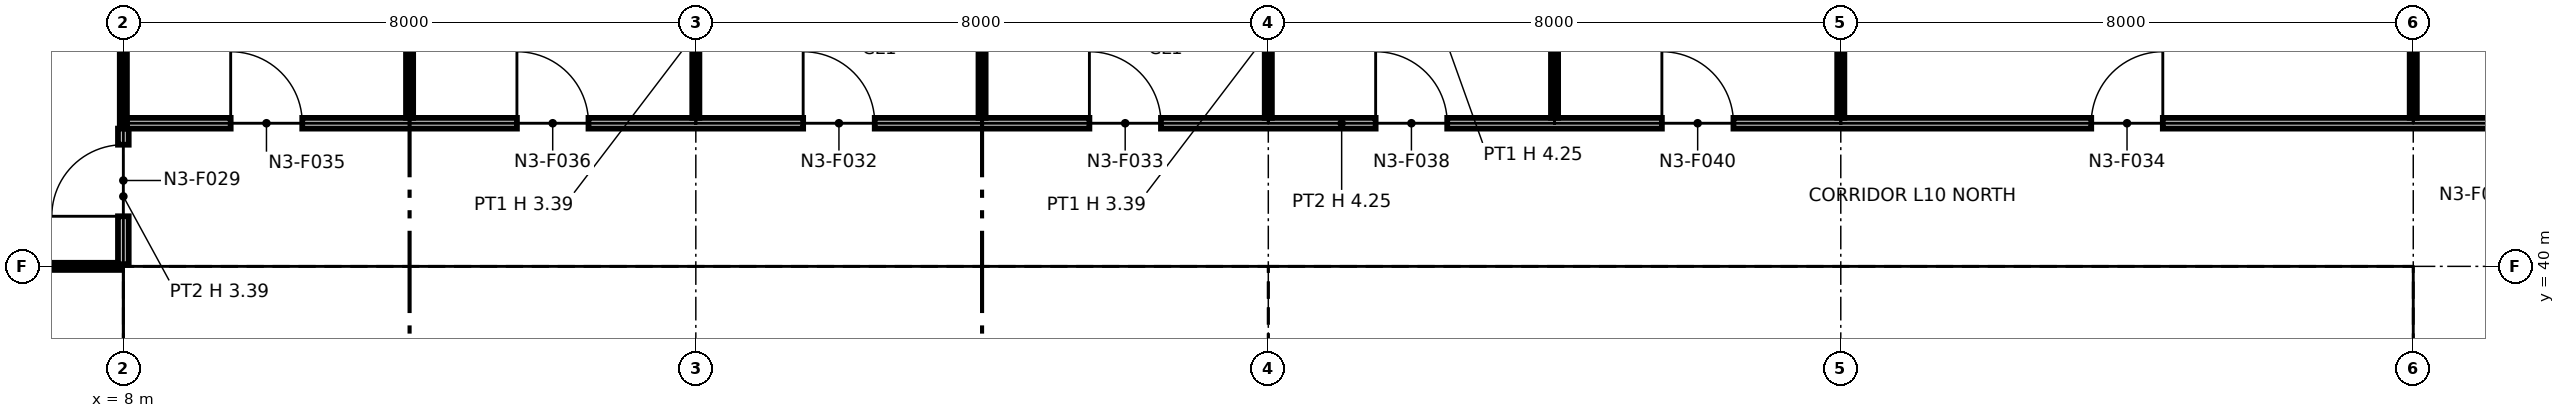
"""IFC4 building model, lengths in metres.
Left out: names, types, materials, properties, quantities, classifications, styles, units other than length and angle.
Written with IfcOpenShell. Run it as: python <this file> out.ifc"""

import sys

from ifc_helpers import new_model, si_unit, direction, frame, frame_2d, origin, origin_2d, place, context, subcontext, project, spatial, polyline, rectangle, i_section, outline, extrude, element, fill, save


model = new_model("IFC4")
c1 = context("Model", 3, precision=1e-05, world=origin(), true_north=direction((0.0, 1.0)))
c2 = subcontext(c1, "Body", "Model", "MODEL_VIEW")
j1 = project(units=[si_unit("LENGTHUNIT", "METRE"), si_unit("PLANEANGLEUNIT", "RADIAN")], contexts=[c1])
p1 = place(None, origin())
s1 = spatial("IfcSite", under=j1, at=p1, CompositionType="ELEMENT")
p2 = place(p1, origin())
s2 = spatial("IfcBuilding", under=s1, at=p2, CompositionType="ELEMENT")
p3 = place(p2, frame((0.0, 0.0, 61.2)))
s3 = spatial("IfcBuildingStorey", under=s2, at=p3, CompositionType="ELEMENT", Elevation=61.2)
for number, where, z_axis, x_axis in (
    (1, (8.0, 40.0, 0.0), (0.0, 0.0, 1.0), (1.0, 0.0, 0.0)),
    (2, (16.0, 40.0, 0.0), (0.0, 0.0, 1.0), (1.0, 0.0, 0.0)),
):
    element("IfcColumn", number, at=place(p3, frame(where, z_axis=z_axis, x_axis=x_axis)), inside=s3, PredefinedType="COLUMN", context=c2, shape_type="SweptSolid", body=[
        extrude(i_section(OverallWidth=0.399, OverallDepth=0.386, WebThickness=0.021, FlangeThickness=0.033, at=origin_2d()), origin(), (0.0, 0.0, 1.0), 4.25),
    ])
p4 = place(p3, frame((24.0, 40.0, 0.0), z_axis=(0.0, 0.0, 1.0), x_axis=(1.0, 0.0, 0.0)))
e3 = element("IfcColumn", 3, at=p4, inside=s3, PredefinedType="COLUMN", context=c2, shape_type="SweptSolid", body=[
    extrude(i_section(OverallWidth=0.401, OverallDepth=0.399, WebThickness=0.025, FlangeThickness=0.04, at=origin_2d()), origin(), (0.0, 0.0, 1.0), 4.25),
])
for number, where, z_axis, x_axis in (
    (4, (32.0, 40.0, 0.0), (0.0, 0.0, 1.0), (1.0, 0.0, 0.0)),
    (5, (40.0, 40.0, 0.0), (0.0, 0.0, 1.0), (1.0, 0.0, 0.0)),
):
    element("IfcColumn", number, at=place(p3, frame(where, z_axis=z_axis, x_axis=x_axis)), inside=s3, PredefinedType="COLUMN", context=c2, shape_type="SweptSolid", body=[
        extrude(i_section(OverallWidth=0.371, OverallDepth=0.361, WebThickness=0.012, FlangeThickness=0.02, at=origin_2d()), origin(), (0.0, 0.0, 1.0), 4.25),
    ])
p5 = place(p3, frame((8.75, 32.85, 0.0), z_axis=(0.0, 0.0, 1.0), x_axis=(0.0, 1.0, 0.0)))
e6 = element("IfcWall", 6, at=p5, inside=s3, PredefinedType="PARTITIONING", context=c2, shape_type="SweptSolid", body=[
    extrude(outline(polyline([(0.0, 0.0), (6.3, 0.0), (6.3, 4.25), (3.231, 4.25), (3.23, 3.789), (3.07, 3.789), (3.069, 4.25), (0.0, 4.25), (0.0, 0.0)])), frame((0.0, 0.1, 0.0), z_axis=(0.0, -1.0, 0.0), x_axis=(1.0, 0.0, 0.0)), (0.0, 0.0, 1.0), 0.2),
])
p6 = place(p3, frame((8.65, 39.25, 0.0), z_axis=(0.0, 0.0, 1.0), x_axis=(1.0, 0.0, 0.0)))
e7 = element("IfcWall", 7, at=p6, inside=s3, PredefinedType="PARTITIONING", context=c2, shape_type="SweptSolid", body=[
    extrude(outline(polyline([(0.0, 0.0), (14.7, 0.0), (14.7, 4.25), (7.469, 4.25), (7.469, 3.632), (7.231, 3.632), (7.23, 4.25), (0.0, 4.25), (0.0, 0.0)])), frame((0.0, 0.1, 0.0), z_axis=(0.0, -1.0, 0.0), x_axis=(1.0, 0.0, 0.0)), (0.0, 0.0, 1.0), 0.2),
])
for number, where, z_axis, x_axis in (
    (8, (10.675, 34.95, 0.0), (0.0, 0.0, 1.0), (0.0, 1.0, 0.0)),
    (9, (12.425, 34.95, 0.0), (0.0, 0.0, 1.0), (0.0, 1.0, 0.0)),
    (10, (14.275, 34.95, 0.0), (0.0, 0.0, 1.0), (0.0, 1.0, 0.0)),
):
    element("IfcWall", number, at=place(p3, frame(where, z_axis=z_axis, x_axis=x_axis)), inside=s3, PredefinedType="PARTITIONING", context=c2, shape_type="SweptSolid", body=[
        extrude(outline(polyline([(0.0, 0.0), (4.2, 0.0), (4.2, 4.25), (1.132, 4.25), (1.131, 3.789), (0.969, 3.789), (0.969, 4.25), (0.0, 4.25), (0.0, 0.0)])), frame((0.0, 0.075, 0.0), z_axis=(0.0, -1.0, 0.0), x_axis=(1.0, 0.0, 0.0)), (0.0, 0.0, 1.0), 0.15),
    ])
p7 = place(p3, frame((16.0, 34.95, 0.0), z_axis=(0.0, 0.0, 1.0), x_axis=(0.0, 1.0, 0.0)))
e11 = element("IfcWall", 11, at=p7, inside=s3, PredefinedType="PARTITIONING", context=c2, shape_type="SweptSolid", body=[
    extrude(rectangle(XDim=4.2, YDim=0.6, at=frame_2d((2.1, 0.0))), origin(), (0.0, 0.0, 1.0), 3.632),
])
for number, where, z_axis, x_axis in (
    (12, (19.2, 32.85, 0.0), (0.0, 0.0, 1.0), (0.0, 1.0, 0.0)),
    (13, (23.25, 32.85, 0.0), (0.0, 0.0, 1.0), (0.0, 1.0, 0.0)),
):
    element("IfcWall", number, at=place(p3, frame(where, z_axis=z_axis, x_axis=x_axis)), inside=s3, PredefinedType="PARTITIONING", context=c2, shape_type="SweptSolid", body=[
        extrude(rectangle(XDim=6.3, YDim=0.2, at=frame_2d((3.15, 0.0))), origin(), (0.0, 0.0, 1.0), 4.25),
    ])
p8 = place(p3, frame((24.75, 32.85, 0.0), z_axis=(0.0, 0.0, 1.0), x_axis=(0.0, 1.0, 0.0)))
e14 = element("IfcWall", 14, at=p8, inside=s3, PredefinedType="PARTITIONING", context=c2, shape_type="SweptSolid", body=[
    extrude(outline(polyline([(0.0, 0.0), (6.3, 0.0), (6.3, 4.25), (3.231, 4.25), (3.23, 3.789), (3.07, 3.789), (3.069, 4.25), (0.0, 4.25), (0.0, 0.0)])), frame((0.0, 0.1, 0.0), z_axis=(0.0, -1.0, 0.0), x_axis=(1.0, 0.0, 0.0)), (0.0, 0.0, 1.0), 0.2),
])
p9 = place(p3, frame((24.65, 39.25, 0.0), z_axis=(0.0, 0.0, 1.0), x_axis=(1.0, 0.0, 0.0)))
e15 = element("IfcWall", 15, at=p9, inside=s3, PredefinedType="PARTITIONING", context=c2, shape_type="SweptSolid", body=[
    extrude(outline(polyline([(0.0, 0.0), (14.7, 0.0), (14.7, 4.25), (7.469, 4.25), (7.469, 3.632), (7.231, 3.632), (7.23, 4.25), (0.0, 4.25), (0.0, 0.0)])), frame((0.0, 0.1, 0.0), z_axis=(0.0, -1.0, 0.0), x_axis=(1.0, 0.0, 0.0)), (0.0, 0.0, 1.0), 0.2),
])
for number, where, z_axis, x_axis in (
    (16, (27.2, 36.4, 0.0), (0.0, 0.0, 1.0), (0.0, 1.0, 0.0)),
    (17, (29.5, 36.4, 0.0), (0.0, 0.0, 1.0), (0.0, 1.0, 0.0)),
):
    element("IfcWall", number, at=place(p3, frame(where, z_axis=z_axis, x_axis=x_axis)), inside=s3, PredefinedType="PARTITIONING", context=c2, shape_type="SweptSolid", body=[
        extrude(rectangle(XDim=2.75, YDim=0.2, at=frame_2d((1.375, 0.0))), origin(), (0.0, 0.0, 1.0), 4.25),
    ])
p10 = place(p3, frame((32.0, 32.85, 0.0), z_axis=(0.0, 0.0, 1.0), x_axis=(0.0, 1.0, 0.0)))
e18 = element("IfcWall", 18, at=p10, inside=s3, PredefinedType="PARTITIONING", context=c2, shape_type="SweptSolid", body=[
    extrude(rectangle(XDim=6.3, YDim=0.6, at=frame_2d((3.15, 0.0))), origin(), (0.0, 0.0, 1.0), 3.632),
])
for number, where, z_axis, x_axis in (
    (19, (35.6, 32.85, 0.0), (0.0, 0.0, 1.0), (0.0, 1.0, 0.0)),
    (20, (39.25, 32.85, 0.0), (0.0, 0.0, 1.0), (0.0, 1.0, 0.0)),
):
    element("IfcWall", number, at=place(p3, frame(where, z_axis=z_axis, x_axis=x_axis)), inside=s3, PredefinedType="PARTITIONING", context=c2, shape_type="SweptSolid", body=[
        extrude(rectangle(XDim=6.3, YDim=0.2, at=frame_2d((3.15, 0.0))), origin(), (0.0, 0.0, 1.0), 4.25),
    ])
p11 = place(p3, frame((4.05, 40.0, 0.0), z_axis=(0.0, 0.0, 1.0), x_axis=(1.0, 0.0, 0.0)))
e21 = element("IfcWall", 21, at=p11, inside=s3, PredefinedType="PARTITIONING", context=c2, shape_type="SweptSolid", body=[
    extrude(rectangle(XDim=3.92, YDim=0.1, at=frame_2d((1.96, 0.0))), origin(), (0.0, 0.0, 1.0), 3.391),
])
p12 = place(p3, frame((8.0, 40.03, 0.0), z_axis=(0.0, 0.0, 1.0), x_axis=(0.0, 1.0, 0.0)))
e22 = element("IfcWall", 22, at=p12, inside=s3, PredefinedType="PARTITIONING", context=c2, shape_type="SweptSolid", body=[
    extrude(rectangle(XDim=1.895, YDim=0.15, at=frame_2d((0.948, 0.0))), origin(), (0.0, 0.0, 1.0), 3.391),
])
p13 = place(p12, frame((0.67, 0.0, 0.0)))
e23 = element("IfcOpeningElement", 23, at=p13, cuts=e22, PredefinedType="OPENING", context=c2, shape_type="SweptSolid", body=[
    extrude(rectangle(XDim=1.0, YDim=2.1, at=frame_2d((0.5, 1.05))), frame((0.0, 0.085, 0.0), z_axis=(0.0, -1.0, 0.0), x_axis=(1.0, 0.0, 0.0)), (0.0, 0.0, 1.0), 0.17),
])
p14 = place(p3, frame((8.05, 42.0, 0.0), z_axis=(0.0, 0.0, 1.0), x_axis=(1.0, 0.0, 0.0)))
e24 = element("IfcWall", 24, at=p14, inside=s3, PredefinedType="PARTITIONING", context=c2, shape_type="SweptSolid", body=[
    extrude(rectangle(XDim=33.95, YDim=0.15, at=frame_2d((16.975, 0.0))), origin(), (0.0, 0.0, 1.0), 4.25),
])
p15 = place(p14, frame((9.45, 0.0, 0.0)))
e25 = element("IfcOpeningElement", 25, at=p15, cuts=e24, PredefinedType="OPENING", context=c2, shape_type="SweptSolid", body=[
    extrude(rectangle(XDim=1.0, YDim=2.1, at=frame_2d((0.5, 1.05))), frame((0.0, 0.085, 0.0), z_axis=(0.0, -1.0, 0.0), x_axis=(1.0, 0.0, 0.0)), (0.0, 0.0, 1.0), 0.17),
])
p16 = place(p14, frame((13.45, 0.0, 0.0)))
e26 = element("IfcOpeningElement", 26, at=p16, cuts=e24, PredefinedType="OPENING", context=c2, shape_type="SweptSolid", body=[
    extrude(rectangle(XDim=1.0, YDim=2.1, at=frame_2d((0.5, 1.05))), frame((0.0, 0.085, 0.0), z_axis=(0.0, -1.0, 0.0), x_axis=(1.0, 0.0, 0.0)), (0.0, 0.0, 1.0), 0.17),
])
p17 = place(p14, frame((27.45, 0.0, 0.0)))
e27 = element("IfcOpeningElement", 27, at=p17, cuts=e24, PredefinedType="OPENING", context=c2, shape_type="SweptSolid", body=[
    extrude(rectangle(XDim=1.0, YDim=2.1, at=frame_2d((0.5, 1.05))), frame((0.0, 0.085, 0.0), z_axis=(0.0, -1.0, 0.0), x_axis=(1.0, 0.0, 0.0)), (0.0, 0.0, 1.0), 0.17),
])
p18 = place(p14, frame((1.45, 0.0, 0.0)))
e28 = element("IfcOpeningElement", 28, at=p18, cuts=e24, PredefinedType="OPENING", context=c2, shape_type="SweptSolid", body=[
    extrude(rectangle(XDim=1.0, YDim=2.1, at=frame_2d((0.5, 1.05))), frame((0.0, 0.085, 0.0), z_axis=(0.0, -1.0, 0.0), x_axis=(1.0, 0.0, 0.0)), (0.0, 0.0, 1.0), 0.17),
])
p19 = place(p14, frame((5.45, 0.0, 0.0)))
e29 = element("IfcOpeningElement", 29, at=p19, cuts=e24, PredefinedType="OPENING", context=c2, shape_type="SweptSolid", body=[
    extrude(rectangle(XDim=1.0, YDim=2.1, at=frame_2d((0.5, 1.05))), frame((0.0, 0.085, 0.0), z_axis=(0.0, -1.0, 0.0), x_axis=(1.0, 0.0, 0.0)), (0.0, 0.0, 1.0), 0.17),
])
p20 = place(p14, frame((17.45, 0.0, 0.0)))
e30 = element("IfcOpeningElement", 30, at=p20, cuts=e24, PredefinedType="OPENING", context=c2, shape_type="SweptSolid", body=[
    extrude(rectangle(XDim=1.0, YDim=2.1, at=frame_2d((0.5, 1.05))), frame((0.0, 0.085, 0.0), z_axis=(0.0, -1.0, 0.0), x_axis=(1.0, 0.0, 0.0)), (0.0, 0.0, 1.0), 0.17),
])
p21 = place(p14, frame((21.45, 0.0, 0.0)))
e31 = element("IfcOpeningElement", 31, at=p21, cuts=e24, PredefinedType="OPENING", context=c2, shape_type="SweptSolid", body=[
    extrude(rectangle(XDim=1.0, YDim=2.1, at=frame_2d((0.5, 1.05))), frame((0.0, 0.085, 0.0), z_axis=(0.0, -1.0, 0.0), x_axis=(1.0, 0.0, 0.0)), (0.0, 0.0, 1.0), 0.17),
])
p22 = place(p3, frame((8.0, 42.0, 0.0), z_axis=(0.0, 0.0, 1.0), x_axis=(0.0, 1.0, 0.0)))
e32 = element("IfcWall", 32, at=p22, inside=s3, PredefinedType="PARTITIONING", context=c2, shape_type="SweptSolid", body=[
    extrude(rectangle(XDim=5.87, YDim=0.1, at=frame_2d((2.935, 0.0))), origin(), (0.0, 0.0, 1.0), 3.391),
])
for number, where, z_axis, x_axis in (
    (33, (12.0, 42.075, 0.0), (0.0, 0.0, 1.0), (0.0, 1.0, 0.0)),
    (34, (16.0, 42.075, 0.0), (0.0, 0.0, 1.0), (0.0, 1.0, 0.0)),
):
    element("IfcWall", number, at=place(p3, frame(where, z_axis=z_axis, x_axis=x_axis)), inside=s3, PredefinedType="PARTITIONING", context=c2, shape_type="SweptSolid", body=[
        extrude(rectangle(XDim=2.375, YDim=0.1, at=frame_2d((1.188, 0.0))), origin(), (0.0, 0.0, 1.0), 3.391),
    ])
p23 = place(p3, frame((20.0, 42.075, 0.0), z_axis=(0.0, 0.0, 1.0), x_axis=(0.0, 1.0, 0.0)))
e35 = element("IfcWall", 35, at=p23, inside=s3, PredefinedType="PARTITIONING", context=c2, shape_type="SweptSolid", body=[
    extrude(rectangle(XDim=3.095, YDim=0.1, at=frame_2d((1.547, 0.0))), origin(), (0.0, 0.0, 1.0), 3.391),
])
for number, where, z_axis, x_axis in (
    (36, (24.0, 42.075, 0.0), (0.0, 0.0, 1.0), (0.0, 1.0, 0.0)),
    (37, (28.0, 42.075, 0.0), (0.0, 0.0, 1.0), (0.0, 1.0, 0.0)),
):
    element("IfcWall", number, at=place(p3, frame(where, z_axis=z_axis, x_axis=x_axis)), inside=s3, PredefinedType="PARTITIONING", context=c2, shape_type="SweptSolid", body=[
        extrude(rectangle(XDim=2.375, YDim=0.1, at=frame_2d((1.188, 0.0))), origin(), (0.0, 0.0, 1.0), 3.391),
    ])
for number, where, z_axis, x_axis in (
    (38, (32.0, 42.075, 0.0), (0.0, 0.0, 1.0), (0.0, 1.0, 0.0)),
    (39, (40.0, 42.075, 0.0), (0.0, 0.0, 1.0), (0.0, 1.0, 0.0)),
):
    element("IfcWall", number, at=place(p3, frame(where, z_axis=z_axis, x_axis=x_axis)), inside=s3, PredefinedType="PARTITIONING", context=c2, shape_type="SweptSolid", body=[
        extrude(rectangle(XDim=3.095, YDim=0.1, at=frame_2d((1.547, 0.0))), origin(), (0.0, 0.0, 1.0), 3.391),
    ])
p24 = place(p13, origin())
e40 = element("IfcDoor", 40, at=p24, inside=s3, OperationType="SINGLE_SWING_LEFT", PredefinedType="DOOR", context=c2, shape_type="SweptSolid", body=[
    extrude(rectangle(XDim=1.0, YDim=2.1, at=frame_2d((0.5, 1.05))), frame((0.0, 0.025, 0.0), z_axis=(0.0, -1.0, 0.0), x_axis=(1.0, 0.0, 0.0)), (0.0, 0.0, 1.0), 0.05),
])
fill(e23, e40)
p25 = place(p15, origin())
e41 = element("IfcDoor", 41, at=p25, inside=s3, OperationType="SINGLE_SWING_LEFT", PredefinedType="DOOR", context=c2, shape_type="SweptSolid", body=[
    extrude(rectangle(XDim=1.0, YDim=2.1, at=frame_2d((0.5, 1.05))), frame((0.0, 0.025, 0.0), z_axis=(0.0, -1.0, 0.0), x_axis=(1.0, 0.0, 0.0)), (0.0, 0.0, 1.0), 0.05),
])
fill(e25, e41)
p26 = place(p16, origin())
e42 = element("IfcDoor", 42, at=p26, inside=s3, OperationType="SINGLE_SWING_LEFT", PredefinedType="DOOR", context=c2, shape_type="SweptSolid", body=[
    extrude(rectangle(XDim=1.0, YDim=2.1, at=frame_2d((0.5, 1.05))), frame((0.0, 0.025, 0.0), z_axis=(0.0, -1.0, 0.0), x_axis=(1.0, 0.0, 0.0)), (0.0, 0.0, 1.0), 0.05),
])
fill(e26, e42)
p27 = place(p17, origin())
e43 = element("IfcDoor", 43, at=p27, inside=s3, OperationType="SINGLE_SWING_RIGHT", PredefinedType="DOOR", context=c2, shape_type="SweptSolid", body=[
    extrude(rectangle(XDim=1.0, YDim=2.1, at=frame_2d((0.5, 1.05))), frame((0.0, 0.025, 0.0), z_axis=(0.0, -1.0, 0.0), x_axis=(1.0, 0.0, 0.0)), (0.0, 0.0, 1.0), 0.05),
])
fill(e27, e43)
p28 = place(p18, origin())
e44 = element("IfcDoor", 44, at=p28, inside=s3, OperationType="SINGLE_SWING_LEFT", PredefinedType="DOOR", context=c2, shape_type="SweptSolid", body=[
    extrude(rectangle(XDim=1.0, YDim=2.1, at=frame_2d((0.5, 1.05))), frame((0.0, 0.025, 0.0), z_axis=(0.0, -1.0, 0.0), x_axis=(1.0, 0.0, 0.0)), (0.0, 0.0, 1.0), 0.05),
])
fill(e28, e44)
p29 = place(p19, origin())
e45 = element("IfcDoor", 45, at=p29, inside=s3, OperationType="SINGLE_SWING_LEFT", PredefinedType="DOOR", context=c2, shape_type="SweptSolid", body=[
    extrude(rectangle(XDim=1.0, YDim=2.1, at=frame_2d((0.5, 1.05))), frame((0.0, 0.025, 0.0), z_axis=(0.0, -1.0, 0.0), x_axis=(1.0, 0.0, 0.0)), (0.0, 0.0, 1.0), 0.05),
])
fill(e29, e45)
p30 = place(p20, origin())
e46 = element("IfcDoor", 46, at=p30, inside=s3, OperationType="SINGLE_SWING_LEFT", PredefinedType="DOOR", context=c2, shape_type="SweptSolid", body=[
    extrude(rectangle(XDim=1.0, YDim=2.1, at=frame_2d((0.5, 1.05))), frame((0.0, 0.025, 0.0), z_axis=(0.0, -1.0, 0.0), x_axis=(1.0, 0.0, 0.0)), (0.0, 0.0, 1.0), 0.05),
])
fill(e30, e46)
p31 = place(p21, origin())
e47 = element("IfcDoor", 47, at=p31, inside=s3, OperationType="SINGLE_SWING_LEFT", PredefinedType="DOOR", context=c2, shape_type="SweptSolid", body=[
    extrude(rectangle(XDim=1.0, YDim=2.1, at=frame_2d((0.5, 1.05))), frame((0.0, 0.025, 0.0), z_axis=(0.0, -1.0, 0.0), x_axis=(1.0, 0.0, 0.0)), (0.0, 0.0, 1.0), 0.05),
])
fill(e31, e47)
save(model, sys.argv[1])
